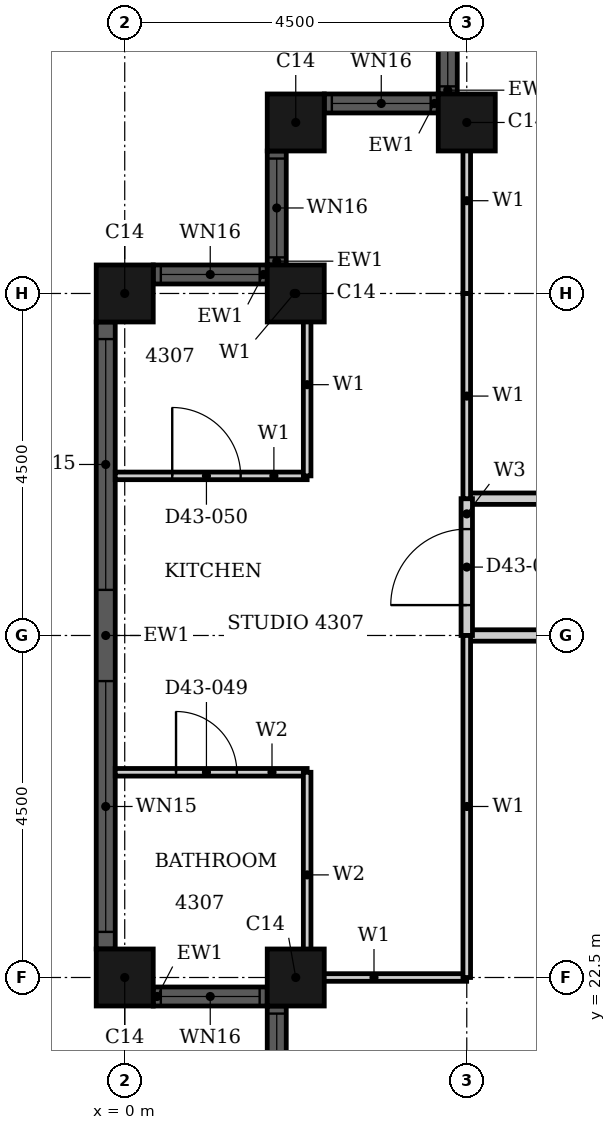
"""IFC4 building model, lengths in metres.
Left out: names, types, materials, properties, quantities, classifications, styles, units other than length and angle.
Written with IfcOpenShell. Run it as: python <this file> out.ifc"""

import sys

from ifc_helpers import new_model, si_unit, direction, frame, frame_2d, origin, origin_2d, place, context, subcontext, project, spatial, rectangle, hollow_rectangle, extrude, element, fill, save


model = new_model("IFC4")
c1 = context("Model", 3, precision=1e-05, world=origin(), true_north=direction((0.0, 1.0)))
c2 = subcontext(c1, "Body", "Model", "MODEL_VIEW")
j1 = project(units=[si_unit("LENGTHUNIT", "METRE"), si_unit("PLANEANGLEUNIT", "RADIAN")], contexts=[c1])
p1 = place(None, origin())
s1 = spatial("IfcSite", under=j1, at=p1, CompositionType="ELEMENT")
p2 = place(p1, origin())
s2 = spatial("IfcBuilding", under=s1, at=p2, CompositionType="ELEMENT")
p3 = place(p2, frame((0.0, 0.0, 172.8)))
s3 = spatial("IfcBuildingStorey", under=s2, at=p3, CompositionType="ELEMENT", Elevation=172.8)
for number, where, z_axis, x_axis in (
    (1, (4.5, 33.75, 0.0), (0.0, 0.0, 1.0), (1.0, 0.0, 0.0)),
    (2, (2.25, 33.75, 0.0), (0.0, 0.0, 1.0), (1.0, 0.0, 0.0)),
    (3, (2.25, 31.5, 0.0), (0.0, 0.0, 1.0), (1.0, 0.0, 0.0)),
    (4, (0.0, 31.5, 0.0), (0.0, 0.0, 1.0), (1.0, 0.0, 0.0)),
    (5, (0.0, 22.5, 0.0), (0.0, 0.0, 1.0), (1.0, 0.0, 0.0)),
    (6, (2.25, 22.5, 0.0), (0.0, 0.0, 1.0), (1.0, 0.0, 0.0)),
):
    element("IfcColumn", number, at=place(p3, frame(where, z_axis=z_axis, x_axis=x_axis)), inside=s3, PredefinedType="COLUMN", context=c2, shape_type="SweptSolid", body=[
        extrude(hollow_rectangle(XDim=0.75, YDim=0.75, WallThickness=0.024, at=origin_2d()), origin(), (0.0, 0.0, 1.0), 3.7),
    ])
p4 = place(p3, frame((4.25, 35.625, 0.0), z_axis=(0.0, 0.0, 1.0), x_axis=(0.0, -1.0, 0.0)))
e7 = element("IfcWall", 7, at=p4, inside=s3, PredefinedType="SOLIDWALL", context=c2, shape_type="SweptSolid", body=[
    extrude(rectangle(XDim=1.5, YDim=0.25, at=frame_2d((0.75, 0.0))), origin(), (0.0, 0.0, 1.0), 3.7),
])
p5 = place(p4, frame((0.1, 0.0, 0.9)))
e8 = element("IfcOpeningElement", 8, at=p5, cuts=e7, PredefinedType="OPENING", context=c2, shape_type="SweptSolid", body=[
    extrude(rectangle(XDim=1.3, YDim=1.85, at=frame_2d((0.65, 0.925))), frame((0.0, 0.135, 0.0), z_axis=(0.0, -1.0, 0.0), x_axis=(1.0, 0.0, 0.0)), (0.0, 0.0, 1.0), 0.27),
])
p6 = place(p3, frame((4.125, 34.0, 0.0), z_axis=(0.0, 0.0, 1.0), x_axis=(-1.0, 0.0, 0.0)))
e9 = element("IfcWall", 9, at=p6, inside=s3, PredefinedType="SOLIDWALL", context=c2, shape_type="SweptSolid", body=[
    extrude(rectangle(XDim=1.5, YDim=0.25, at=frame_2d((0.75, 0.0))), origin(), (0.0, 0.0, 1.0), 3.7),
])
p7 = place(p6, frame((0.1, 0.0, 0.9)))
e10 = element("IfcOpeningElement", 10, at=p7, cuts=e9, PredefinedType="OPENING", context=c2, shape_type="SweptSolid", body=[
    extrude(rectangle(XDim=1.3, YDim=1.85, at=frame_2d((0.65, 0.925))), frame((0.0, 0.135, 0.0), z_axis=(0.0, -1.0, 0.0), x_axis=(1.0, 0.0, 0.0)), (0.0, 0.0, 1.0), 0.27),
])
p8 = place(p3, frame((2.0, 33.375, 0.0), z_axis=(0.0, 0.0, 1.0), x_axis=(0.0, -1.0, 0.0)))
e11 = element("IfcWall", 11, at=p8, inside=s3, PredefinedType="SOLIDWALL", context=c2, shape_type="SweptSolid", body=[
    extrude(rectangle(XDim=1.5, YDim=0.25, at=frame_2d((0.75, 0.0))), origin(), (0.0, 0.0, 1.0), 3.7),
])
p9 = place(p8, frame((0.1, 0.0, 0.9)))
e12 = element("IfcOpeningElement", 12, at=p9, cuts=e11, PredefinedType="OPENING", context=c2, shape_type="SweptSolid", body=[
    extrude(rectangle(XDim=1.3, YDim=1.85, at=frame_2d((0.65, 0.925))), frame((0.0, 0.135, 0.0), z_axis=(0.0, -1.0, 0.0), x_axis=(1.0, 0.0, 0.0)), (0.0, 0.0, 1.0), 0.27),
])
p10 = place(p3, frame((1.875, 31.75, 0.0), z_axis=(0.0, 0.0, 1.0), x_axis=(-1.0, 0.0, 0.0)))
e13 = element("IfcWall", 13, at=p10, inside=s3, PredefinedType="SOLIDWALL", context=c2, shape_type="SweptSolid", body=[
    extrude(rectangle(XDim=1.5, YDim=0.25, at=frame_2d((0.75, 0.0))), origin(), (0.0, 0.0, 1.0), 3.7),
])
p11 = place(p10, frame((0.1, 0.0, 0.9)))
e14 = element("IfcOpeningElement", 14, at=p11, cuts=e13, PredefinedType="OPENING", context=c2, shape_type="SweptSolid", body=[
    extrude(rectangle(XDim=1.3, YDim=1.85, at=frame_2d((0.65, 0.925))), frame((0.0, 0.135, 0.0), z_axis=(0.0, -1.0, 0.0), x_axis=(1.0, 0.0, 0.0)), (0.0, 0.0, 1.0), 0.27),
])
p12 = place(p3, frame((-0.25, 31.125, 0.0), z_axis=(0.0, 0.0, 1.0), x_axis=(0.0, -1.0, 0.0)))
e15 = element("IfcWall", 15, at=p12, inside=s3, PredefinedType="SOLIDWALL", context=c2, shape_type="SweptSolid", body=[
    extrude(rectangle(XDim=8.25, YDim=0.25, at=frame_2d((4.125, 0.0))), origin(), (0.0, 0.0, 1.0), 3.7),
])
p13 = place(p12, frame((0.225, 0.0, 0.45)))
e16 = element("IfcOpeningElement", 16, at=p13, cuts=e15, PredefinedType="OPENING", context=c2, shape_type="SweptSolid", body=[
    extrude(rectangle(XDim=3.3, YDim=2.3, at=frame_2d((1.65, 1.15))), frame((0.0, 0.135, 0.0), z_axis=(0.0, -1.0, 0.0), x_axis=(1.0, 0.0, 0.0)), (0.0, 0.0, 1.0), 0.27),
])
p14 = place(p12, frame((4.725, 0.0, 0.45)))
e17 = element("IfcOpeningElement", 17, at=p14, cuts=e15, PredefinedType="OPENING", context=c2, shape_type="SweptSolid", body=[
    extrude(rectangle(XDim=3.3, YDim=2.3, at=frame_2d((1.65, 1.15))), frame((0.0, 0.135, 0.0), z_axis=(0.0, -1.0, 0.0), x_axis=(1.0, 0.0, 0.0)), (0.0, 0.0, 1.0), 0.27),
])
p15 = place(p3, frame((0.375, 22.25, 0.0), z_axis=(0.0, 0.0, 1.0), x_axis=(1.0, 0.0, 0.0)))
e18 = element("IfcWall", 18, at=p15, inside=s3, PredefinedType="SOLIDWALL", context=c2, shape_type="SweptSolid", body=[
    extrude(rectangle(XDim=1.5, YDim=0.25, at=frame_2d((0.75, 0.0))), origin(), (0.0, 0.0, 1.0), 3.7),
])
p16 = place(p15, frame((0.1, 0.0, 0.9)))
e19 = element("IfcOpeningElement", 19, at=p16, cuts=e18, PredefinedType="OPENING", context=c2, shape_type="SweptSolid", body=[
    extrude(rectangle(XDim=1.3, YDim=1.85, at=frame_2d((0.65, 0.925))), frame((0.0, 0.135, 0.0), z_axis=(0.0, -1.0, 0.0), x_axis=(1.0, 0.0, 0.0)), (0.0, 0.0, 1.0), 0.27),
])
p17 = place(p3, frame((2.0, 22.125, 0.0), z_axis=(0.0, 0.0, 1.0), x_axis=(0.0, -1.0, 0.0)))
e20 = element("IfcWall", 20, at=p17, inside=s3, PredefinedType="SOLIDWALL", context=c2, shape_type="SweptSolid", body=[
    extrude(rectangle(XDim=1.5, YDim=0.25, at=frame_2d((0.75, 0.0))), origin(), (0.0, 0.0, 1.0), 3.7),
])
p18 = place(p17, frame((0.1, 0.0, 0.9)))
e21 = element("IfcOpeningElement", 21, at=p18, cuts=e20, PredefinedType="OPENING", context=c2, shape_type="SweptSolid", body=[
    extrude(rectangle(XDim=1.3, YDim=1.85, at=frame_2d((0.65, 0.925))), frame((0.0, 0.135, 0.0), z_axis=(0.0, -1.0, 0.0), x_axis=(1.0, 0.0, 0.0)), (0.0, 0.0, 1.0), 0.27),
])
p19 = place(p3, frame((4.5, 27.0, 0.0), z_axis=(0.0, 0.0, 1.0), x_axis=(1.0, 0.0, 0.0)))
e22 = element("IfcWall", 22, at=p19, inside=s3, PredefinedType="PARTITIONING", context=c2, shape_type="SweptSolid", body=[
    extrude(rectangle(XDim=13.5, YDim=0.15, at=frame_2d((6.75, 0.0))), origin(), (0.0, 0.0, 1.0), 2.68),
])
p20 = place(p19, frame((5.35, 0.0, 0.0)))
e23 = element("IfcOpeningElement", 23, at=p20, cuts=e22, PredefinedType="OPENING", context=c2, shape_type="SweptSolid", body=[
    extrude(rectangle(XDim=1.0, YDim=2.1, at=frame_2d((0.5, 1.05))), frame((0.0, 0.085, 0.0), z_axis=(0.0, -1.0, 0.0), x_axis=(1.0, 0.0, 0.0)), (0.0, 0.0, 1.0), 0.17),
])
p21 = place(p3, frame((4.5, 28.8, 0.0), z_axis=(0.0, 0.0, 1.0), x_axis=(1.0, 0.0, 0.0)))
e24 = element("IfcWall", 24, at=p21, inside=s3, PredefinedType="PARTITIONING", context=c2, shape_type="SweptSolid", body=[
    extrude(rectangle(XDim=11.699, YDim=0.15, at=frame_2d((5.85, 0.0))), origin(), (0.0, 0.0, 1.0), 3.4),
])
p22 = place(p21, frame((4.0, 0.0, 0.0)))
e25 = element("IfcOpeningElement", 25, at=p22, cuts=e24, PredefinedType="OPENING", context=c2, shape_type="SweptSolid", body=[
    extrude(rectangle(XDim=1.0, YDim=2.1, at=frame_2d((0.5, 1.05))), frame((0.0, 0.085, 0.0), z_axis=(0.0, -1.0, 0.0), x_axis=(1.0, 0.0, 0.0)), (0.0, 0.0, 1.0), 0.17),
])
p23 = place(p3, frame((4.5, 27.0, 0.0), z_axis=(0.0, 0.0, 1.0), x_axis=(0.0, 1.0, 0.0)))
e26 = element("IfcWall", 26, at=p23, inside=s3, PredefinedType="PARTITIONING", context=c2, shape_type="SweptSolid", body=[
    extrude(rectangle(XDim=1.8, YDim=0.15, at=frame_2d((0.9, 0.0))), origin(), (0.0, 0.0, 1.0), 3.4),
])
p24 = place(p23, frame((0.4, 0.0, 0.0)))
e27 = element("IfcOpeningElement", 27, at=p24, cuts=e26, PredefinedType="OPENING", context=c2, shape_type="SweptSolid", body=[
    extrude(rectangle(XDim=1.0, YDim=2.2, at=frame_2d((0.5, 1.1))), frame((0.0, 0.085, 0.0), z_axis=(0.0, -1.0, 0.0), x_axis=(1.0, 0.0, 0.0)), (0.0, 0.0, 1.0), 0.17),
])
p25 = place(p3, frame((2.06, 22.5, 0.0), z_axis=(0.0, 0.0, 1.0), x_axis=(1.0, 0.0, 0.0)))
e28 = element("IfcWall", 28, at=p25, inside=s3, PredefinedType="PARTITIONING", context=c2, shape_type="SweptSolid", body=[
    extrude(rectangle(XDim=2.439, YDim=0.1, at=frame_2d((1.219, 0.0))), origin(), (0.0, 0.0, 1.0), 2.68),
])
p26 = place(p3, frame((-0.125, 29.1, 0.0), z_axis=(0.0, 0.0, 1.0), x_axis=(1.0, 0.0, 0.0)))
e29 = element("IfcWall", 29, at=p26, inside=s3, PredefinedType="PARTITIONING", context=c2, shape_type="SweptSolid", body=[
    extrude(rectangle(XDim=2.525, YDim=0.1, at=frame_2d((1.262, 0.0))), origin(), (0.0, 0.0, 1.0), 3.4),
])
p27 = place(p26, frame((0.75, 0.0, 0.0)))
e30 = element("IfcOpeningElement", 30, at=p27, cuts=e29, PredefinedType="OPENING", context=c2, shape_type="SweptSolid", body=[
    extrude(rectangle(XDim=0.9, YDim=2.1, at=frame_2d((0.45, 1.05))), frame((0.0, 0.06, 0.0), z_axis=(0.0, -1.0, 0.0), x_axis=(1.0, 0.0, 0.0)), (0.0, 0.0, 1.0), 0.12),
])
p28 = place(p3, frame((2.06, 31.5, 0.0), z_axis=(0.0, 0.0, 1.0), x_axis=(1.0, 0.0, 0.0)))
e31 = element("IfcWall", 31, at=p28, inside=s3, PredefinedType="PARTITIONING", context=c2, shape_type="SweptSolid", body=[
    extrude(rectangle(XDim=0.34, YDim=0.1, at=frame_2d((0.17, 0.0))), origin(), (0.0, 0.0, 1.0), 3.4),
])
p29 = place(p3, frame((2.4, 29.1, 0.0), z_axis=(0.0, 0.0, 1.0), x_axis=(0.0, 1.0, 0.0)))
e32 = element("IfcWall", 32, at=p29, inside=s3, PredefinedType="PARTITIONING", context=c2, shape_type="SweptSolid", body=[
    extrude(rectangle(XDim=2.4, YDim=0.1, at=frame_2d((1.2, 0.0))), origin(), (0.0, 0.0, 1.0), 3.4),
])
p30 = place(p3, frame((4.5, 28.8, 0.0), z_axis=(0.0, 0.0, 1.0), x_axis=(0.0, 1.0, 0.0)))
e33 = element("IfcWall", 33, at=p30, inside=s3, PredefinedType="PARTITIONING", context=c2, shape_type="SweptSolid", body=[
    extrude(rectangle(XDim=2.7, YDim=0.1, at=frame_2d((1.35, 0.0))), origin(), (0.0, 0.0, 1.0), 3.4),
])
p31 = place(p3, frame((4.5, 31.501, 0.0), z_axis=(0.0, 0.0, 1.0), x_axis=(0.0, 1.0, 0.0)))
e34 = element("IfcWall", 34, at=p31, inside=s3, PredefinedType="PARTITIONING", context=c2, shape_type="SweptSolid", body=[
    extrude(rectangle(XDim=2.439, YDim=0.1, at=frame_2d((1.219, 0.0))), origin(), (0.0, 0.0, 1.0), 3.4),
])
p32 = place(p3, frame((4.5, 22.5, 0.0), z_axis=(0.0, 0.0, 1.0), x_axis=(0.0, 1.0, 0.0)))
e35 = element("IfcWall", 35, at=p32, inside=s3, PredefinedType="PARTITIONING", context=c2, shape_type="SweptSolid", body=[
    extrude(rectangle(XDim=4.5, YDim=0.1, at=frame_2d((2.25, 0.0))), origin(), (0.0, 0.0, 1.0), 3.4),
])
p33 = place(p3, frame((-0.125, 25.2, 0.0), z_axis=(0.0, 0.0, 1.0), x_axis=(1.0, 0.0, 0.0)))
e36 = element("IfcWall", 36, at=p33, inside=s3, PredefinedType="PARTITIONING", context=c2, shape_type="SweptSolid", body=[
    extrude(rectangle(XDim=2.525, YDim=0.1, at=frame_2d((1.262, 0.0))), origin(), (0.0, 0.0, 1.0), 3.4),
])
p34 = place(p33, frame((0.8, 0.0, 0.0)))
e37 = element("IfcOpeningElement", 37, at=p34, cuts=e36, PredefinedType="OPENING", context=c2, shape_type="SweptSolid", body=[
    extrude(rectangle(XDim=0.8, YDim=2.1, at=frame_2d((0.4, 1.05))), frame((0.0, 0.06, 0.0), z_axis=(0.0, -1.0, 0.0), x_axis=(1.0, 0.0, 0.0)), (0.0, 0.0, 1.0), 0.12),
])
p35 = place(p3, frame((2.4, 22.5, 0.0), z_axis=(0.0, 0.0, 1.0), x_axis=(0.0, 1.0, 0.0)))
e38 = element("IfcWall", 38, at=p35, inside=s3, PredefinedType="PARTITIONING", context=c2, shape_type="SweptSolid", body=[
    extrude(rectangle(XDim=2.7, YDim=0.1, at=frame_2d((1.35, 0.0))), origin(), (0.0, 0.0, 1.0), 3.4),
])
p36 = place(p5, origin())
e39 = element("IfcWindow", 39, at=p36, inside=s3, PartitioningType="SINGLE_PANEL", PredefinedType="WINDOW", context=c2, shape_type="SweptSolid", body=[
    extrude(rectangle(XDim=1.3, YDim=1.85, at=frame_2d((0.65, 0.925))), frame((0.0, 0.03, 0.0), z_axis=(0.0, -1.0, 0.0), x_axis=(1.0, 0.0, 0.0)), (0.0, 0.0, 1.0), 0.06),
])
fill(e8, e39)
p37 = place(p7, origin())
e40 = element("IfcWindow", 40, at=p37, inside=s3, PartitioningType="SINGLE_PANEL", PredefinedType="WINDOW", context=c2, shape_type="SweptSolid", body=[
    extrude(rectangle(XDim=1.3, YDim=1.85, at=frame_2d((0.65, 0.925))), frame((0.0, 0.03, 0.0), z_axis=(0.0, -1.0, 0.0), x_axis=(1.0, 0.0, 0.0)), (0.0, 0.0, 1.0), 0.06),
])
fill(e10, e40)
p38 = place(p9, origin())
e41 = element("IfcWindow", 41, at=p38, inside=s3, PartitioningType="SINGLE_PANEL", PredefinedType="WINDOW", context=c2, shape_type="SweptSolid", body=[
    extrude(rectangle(XDim=1.3, YDim=1.85, at=frame_2d((0.65, 0.925))), frame((0.0, 0.03, 0.0), z_axis=(0.0, -1.0, 0.0), x_axis=(1.0, 0.0, 0.0)), (0.0, 0.0, 1.0), 0.06),
])
fill(e12, e41)
p39 = place(p11, origin())
e42 = element("IfcWindow", 42, at=p39, inside=s3, PartitioningType="SINGLE_PANEL", PredefinedType="WINDOW", context=c2, shape_type="SweptSolid", body=[
    extrude(rectangle(XDim=1.3, YDim=1.85, at=frame_2d((0.65, 0.925))), frame((0.0, 0.03, 0.0), z_axis=(0.0, -1.0, 0.0), x_axis=(1.0, 0.0, 0.0)), (0.0, 0.0, 1.0), 0.06),
])
fill(e14, e42)
p40 = place(p13, origin())
e43 = element("IfcWindow", 43, at=p40, inside=s3, PartitioningType="SINGLE_PANEL", PredefinedType="WINDOW", context=c2, shape_type="SweptSolid", body=[
    extrude(rectangle(XDim=3.3, YDim=2.3, at=frame_2d((1.65, 1.15))), frame((0.0, 0.03, 0.0), z_axis=(0.0, -1.0, 0.0), x_axis=(1.0, 0.0, 0.0)), (0.0, 0.0, 1.0), 0.06),
])
fill(e16, e43)
p41 = place(p14, origin())
e44 = element("IfcWindow", 44, at=p41, inside=s3, PartitioningType="SINGLE_PANEL", PredefinedType="WINDOW", context=c2, shape_type="SweptSolid", body=[
    extrude(rectangle(XDim=3.3, YDim=2.3, at=frame_2d((1.65, 1.15))), frame((0.0, 0.03, 0.0), z_axis=(0.0, -1.0, 0.0), x_axis=(1.0, 0.0, 0.0)), (0.0, 0.0, 1.0), 0.06),
])
fill(e17, e44)
p42 = place(p16, origin())
e45 = element("IfcWindow", 45, at=p42, inside=s3, PartitioningType="SINGLE_PANEL", PredefinedType="WINDOW", context=c2, shape_type="SweptSolid", body=[
    extrude(rectangle(XDim=1.3, YDim=1.85, at=frame_2d((0.65, 0.925))), frame((0.0, 0.03, 0.0), z_axis=(0.0, -1.0, 0.0), x_axis=(1.0, 0.0, 0.0)), (0.0, 0.0, 1.0), 0.06),
])
fill(e19, e45)
p43 = place(p18, origin())
e46 = element("IfcWindow", 46, at=p43, inside=s3, PartitioningType="SINGLE_PANEL", PredefinedType="WINDOW", context=c2, shape_type="SweptSolid", body=[
    extrude(rectangle(XDim=1.3, YDim=1.85, at=frame_2d((0.65, 0.925))), frame((0.0, 0.03, 0.0), z_axis=(0.0, -1.0, 0.0), x_axis=(1.0, 0.0, 0.0)), (0.0, 0.0, 1.0), 0.06),
])
fill(e21, e46)
p44 = place(p24, origin())
e47 = element("IfcDoor", 47, at=p44, inside=s3, OperationType="SINGLE_SWING_RIGHT", PredefinedType="DOOR", context=c2, shape_type="SweptSolid", body=[
    extrude(rectangle(XDim=1.0, YDim=2.2, at=frame_2d((0.5, 1.1))), frame((0.0, 0.025, 0.0), z_axis=(0.0, -1.0, 0.0), x_axis=(1.0, 0.0, 0.0)), (0.0, 0.0, 1.0), 0.05),
])
fill(e27, e47)
p45 = place(p34, origin())
e48 = element("IfcDoor", 48, at=p45, inside=s3, OperationType="SINGLE_SWING_LEFT", PredefinedType="DOOR", context=c2, shape_type="SweptSolid", body=[
    extrude(rectangle(XDim=0.8, YDim=2.1, at=frame_2d((0.4, 1.05))), frame((0.0, 0.025, 0.0), z_axis=(0.0, -1.0, 0.0), x_axis=(1.0, 0.0, 0.0)), (0.0, 0.0, 1.0), 0.05),
])
fill(e37, e48)
p46 = place(p27, origin())
e49 = element("IfcDoor", 49, at=p46, inside=s3, OperationType="SINGLE_SWING_LEFT", PredefinedType="DOOR", context=c2, shape_type="SweptSolid", body=[
    extrude(rectangle(XDim=0.9, YDim=2.1, at=frame_2d((0.45, 1.05))), frame((0.0, 0.025, 0.0), z_axis=(0.0, -1.0, 0.0), x_axis=(1.0, 0.0, 0.0)), (0.0, 0.0, 1.0), 0.05),
])
fill(e30, e49)
save(model, sys.argv[1])
